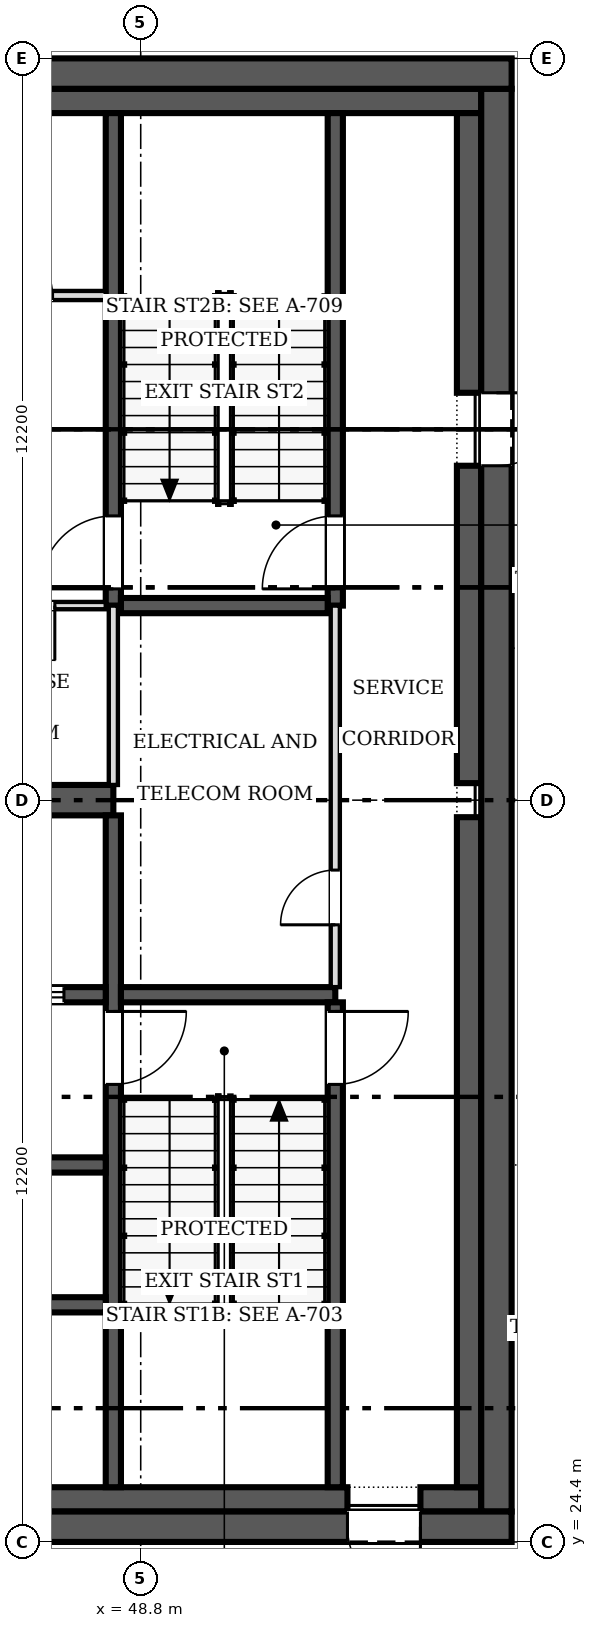
"""IFC4 building model, lengths in metres.
Left out: names, types, materials, properties, quantities, classifications, styles, units other than length and angle.
Written with IfcOpenShell. Run it as: python <this file> out.ifc"""

import sys

from ifc_helpers import new_model, si_unit, direction, frame, frame_2d, origin, place, context, subcontext, project, spatial, rectangle, extrude, source, transform, mapped, element, fill, save


model = new_model("IFC4")
c1 = context("Model", 3, precision=1e-05, world=origin(), true_north=direction((0.0, 1.0)))
c2 = subcontext(c1, "Body", "Model", "MODEL_VIEW")
j1 = project(units=[si_unit("LENGTHUNIT", "METRE"), si_unit("PLANEANGLEUNIT", "RADIAN")], contexts=[c1])
p1 = place(None, origin())
s1 = spatial("IfcSite", under=j1, at=p1, CompositionType="ELEMENT")
p2 = place(p1, origin())
s2 = spatial("IfcBuilding", under=s1, at=p2, CompositionType="ELEMENT")
p3 = place(p2, frame((0.0, 0.0, 193.4)))
s3 = spatial("IfcBuildingStorey", under=s2, at=p3, CompositionType="ELEMENT", Elevation=193.4)
p4 = place(p3, frame((54.9, 24.65, 0.0), z_axis=(0.0, 0.0, 1.0), x_axis=(-1.0, 0.0, 0.0)))
e1 = element("IfcWall", 1, at=p4, inside=s3, PredefinedType="SHEAR", context=c2, shape_type="SweptSolid", body=[
    extrude(rectangle(XDim=24.4, YDim=0.5, at=frame_2d((12.2, 0.0))), origin(), (0.0, 0.0, 1.0), 4.5),
])
m1 = source(origin(), c2, "Body", "SweptSolid", [
    extrude(rectangle(XDim=1.2, YDim=2.1, at=frame_2d((0.6, 1.05))), frame((0.0, 0.26, 0.0), z_axis=(0.0, -1.0, 0.0), x_axis=(1.0, 0.0, 0.0)), (0.0, 0.0, 1.0), 0.52),
])
p5 = place(p4, frame((1.5, 0.0, 0.0)))
e2 = element("IfcOpeningElement", 2, at=p5, cuts=e1, PredefinedType="OPENING", context=c2, shape_type="MappedRepresentation", body=[
    mapped(m1, transform((0.0, 0.0, 0.0), scale=1.0)),
])
p6 = place(p3, frame((30.5, 48.55, 0.0), z_axis=(0.0, 0.0, 1.0), x_axis=(1.0, 0.0, 0.0)))
e3 = element("IfcWall", 3, at=p6, inside=s3, PredefinedType="SHEAR", context=c2, shape_type="SweptSolid", body=[
    extrude(rectangle(XDim=24.4, YDim=0.5, at=frame_2d((12.2, 0.0))), origin(), (0.0, 0.0, 1.0), 4.5),
])
p7 = place(p3, frame((54.65, 48.3, 0.0), z_axis=(0.0, 0.0, 1.0), x_axis=(0.0, -1.0, 0.0)))
e4 = element("IfcWall", 4, at=p7, inside=s3, PredefinedType="SHEAR", context=c2, shape_type="SweptSolid", body=[
    extrude(rectangle(XDim=23.4, YDim=0.5, at=frame_2d((11.7, 0.0))), origin(), (0.0, 0.0, 1.0), 4.5),
])
p8 = place(p7, frame((5.0, 0.0, 0.0)))
e5 = element("IfcOpeningElement", 5, at=p8, cuts=e4, PredefinedType="OPENING", context=c2, shape_type="MappedRepresentation", body=[
    mapped(m1, transform((0.0, 0.0, 0.0), scale=1.0)),
])
p9 = place(p3, frame((31.0, 25.1, 0.0), z_axis=(0.0, 0.0, 1.0), x_axis=(1.0, 0.0, 0.0)))
e6 = element("IfcWall", 6, at=p9, inside=s3, PredefinedType="SOLIDWALL", context=c2, shape_type="SweptSolid", body=[
    extrude(rectangle(XDim=21.2, YDim=0.4, at=frame_2d((10.6, 0.0))), origin(), (0.0, 0.0, 1.0), 4.5),
])
p10 = place(p3, frame((53.4, 25.1, 0.0), z_axis=(0.0, 0.0, 1.0), x_axis=(1.0, 0.0, 0.0)))
e7 = element("IfcWall", 7, at=p10, inside=s3, PredefinedType="SOLIDWALL", context=c2, shape_type="SweptSolid", body=[
    extrude(rectangle(XDim=1.0, YDim=0.4, at=frame_2d((0.5, 0.0))), origin(), (0.0, 0.0, 1.0), 4.5),
])
p11 = place(p3, frame((31.0, 48.1, 0.0), z_axis=(0.0, 0.0, 1.0), x_axis=(1.0, 0.0, 0.0)))
e8 = element("IfcWall", 8, at=p11, inside=s3, PredefinedType="SOLIDWALL", context=c2, shape_type="SweptSolid", body=[
    extrude(rectangle(XDim=23.4, YDim=0.4, at=frame_2d((11.7, 0.0))), origin(), (0.0, 0.0, 1.0), 4.5),
])
p12 = place(p3, frame((54.2, 25.3, 0.0), z_axis=(0.0, 0.0, 1.0), x_axis=(0.0, 1.0, 0.0)))
e9 = element("IfcWall", 9, at=p12, inside=s3, PredefinedType="SOLIDWALL", context=c2, shape_type="SweptSolid", body=[
    extrude(rectangle(XDim=11.02, YDim=0.4, at=frame_2d((5.51, 0.0))), origin(), (0.0, 0.0, 1.0), 4.5),
])
p13 = place(p3, frame((54.2, 36.88, 0.0), z_axis=(0.0, 0.0, 1.0), x_axis=(0.0, 1.0, 0.0)))
e10 = element("IfcWall", 10, at=p13, inside=s3, PredefinedType="SOLIDWALL", context=c2, shape_type="SweptSolid", body=[
    extrude(rectangle(XDim=5.22, YDim=0.4, at=frame_2d((2.61, 0.0))), origin(), (0.0, 0.0, 1.0), 4.5),
])
p14 = place(p3, frame((54.2, 43.3, 0.0), z_axis=(0.0, 0.0, 1.0), x_axis=(0.0, 1.0, 0.0)))
e11 = element("IfcWall", 11, at=p14, inside=s3, PredefinedType="SOLIDWALL", context=c2, shape_type="SweptSolid", body=[
    extrude(rectangle(XDim=4.6, YDim=0.4, at=frame_2d((2.3, 0.0))), origin(), (0.0, 0.0, 1.0), 4.5),
])
p15 = place(p3, frame((31.4, 36.6, 0.0), z_axis=(0.0, 0.0, 1.0), x_axis=(1.0, 0.0, 0.0)))
e12 = element("IfcWall", 12, at=p15, inside=s3, PredefinedType="SHEAR", context=c2, shape_type="SweptSolid", body=[
    extrude(rectangle(XDim=16.95, YDim=0.5, at=frame_2d((8.475, 0.0))), origin(), (0.0, 0.0, 1.0), 4.5),
])
p16 = place(p3, frame((48.35, 36.35, 0.0), z_axis=(0.0, 0.0, 1.0), x_axis=(0.0, -1.0, 0.0)))
e13 = element("IfcWall", 13, at=p16, inside=s3, PredefinedType="SOLIDWALL", context=c2, shape_type="SweptSolid", body=[
    extrude(rectangle(XDim=11.05, YDim=0.25, at=frame_2d((5.525, 0.0))), origin(), (0.0, 0.0, 1.0), 4.5),
])
m2 = source(origin(), c2, "Body", "SweptSolid", [
    extrude(rectangle(XDim=1.2, YDim=2.1, at=frame_2d((0.6, 1.05))), frame((0.0, 0.135, 0.0), z_axis=(0.0, -1.0, 0.0), x_axis=(1.0, 0.0, 0.0)), (0.0, 0.0, 1.0), 0.27),
])
p17 = place(p16, frame((3.225, 0.0, 0.0)))
e14 = element("IfcOpeningElement", 14, at=p17, cuts=e13, PredefinedType="OPENING", context=c2, shape_type="MappedRepresentation", body=[
    mapped(m2, transform((0.0, 0.0, 0.0), scale=1.0)),
])
p18 = place(p3, frame((48.225, 33.4, 0.0), z_axis=(0.0, 0.0, 1.0), x_axis=(-1.0, 0.0, 0.0)))
e15 = element("IfcWall", 15, at=p18, inside=s3, PredefinedType="SOLIDWALL", context=c2, shape_type="SweptSolid", body=[
    extrude(rectangle(XDim=5.275, YDim=0.25, at=frame_2d((2.638, 0.0))), origin(), (0.0, 0.0, 1.0), 4.5),
])
p19 = place(p18, frame((3.512, 0.0, 0.0)))
e16 = element("IfcOpeningElement", 16, at=p19, cuts=e15, PredefinedType="OPENING", context=c2, shape_type="MappedRepresentation", body=[
    mapped(m2, transform((0.0, 0.0, 0.0), scale=1.0)),
])
p20 = place(p18, frame((0.688, 0.0, 0.0)))
e17 = element("IfcOpeningElement", 17, at=p20, cuts=e15, PredefinedType="OPENING", context=c2, shape_type="MappedRepresentation", body=[
    mapped(m2, transform((0.0, 0.0, 0.0), scale=1.0)),
])
p21 = place(p3, frame((48.475, 33.4, 0.0), z_axis=(0.0, 0.0, 1.0), x_axis=(1.0, 0.0, 0.0)))
e18 = element("IfcWall", 18, at=p21, inside=s3, PredefinedType="SOLIDWALL", context=c2, shape_type="SweptSolid", body=[
    extrude(rectangle(XDim=3.525, YDim=0.25, at=frame_2d((1.762, 0.0))), origin(), (0.0, 0.0, 1.0), 4.5),
])
p22 = place(p3, frame((48.35, 47.9, 0.0), z_axis=(0.0, 0.0, 1.0), x_axis=(0.0, -1.0, 0.0)))
e19 = element("IfcWall", 19, at=p22, inside=s3, PredefinedType="SOLIDWALL", context=c2, shape_type="SweptSolid", body=[
    extrude(rectangle(XDim=8.1, YDim=0.25, at=frame_2d((4.05, 0.0))), origin(), (0.0, 0.0, 1.0), 4.5),
])
p23 = place(p22, frame((6.625, 0.0, 0.0)))
e20 = element("IfcOpeningElement", 20, at=p23, cuts=e19, PredefinedType="OPENING", context=c2, shape_type="MappedRepresentation", body=[
    mapped(m2, transform((0.0, 0.0, 0.0), scale=1.0)),
])
p24 = place(p3, frame((52.0, 25.3, 0.0), z_axis=(0.0, 0.0, 1.0), x_axis=(0.0, 1.0, 0.0)))
e21 = element("IfcWall", 21, at=p24, inside=s3, PredefinedType="SOLIDWALL", context=c2, shape_type="SweptSolid", body=[
    extrude(rectangle(XDim=7.975, YDim=0.25, at=frame_2d((3.987, 0.0))), origin(), (0.0, 0.0, 1.0), 4.5),
])
p25 = place(p24, frame((6.625, 0.0, 0.0)))
e22 = element("IfcOpeningElement", 22, at=p25, cuts=e21, PredefinedType="OPENING", context=c2, shape_type="MappedRepresentation", body=[
    mapped(m2, transform((0.0, 0.0, 0.0), scale=1.0)),
])
p26 = place(p3, frame((52.0, 39.8, 0.0), z_axis=(0.0, 0.0, 1.0), x_axis=(0.0, 1.0, 0.0)))
e23 = element("IfcWall", 23, at=p26, inside=s3, PredefinedType="SOLIDWALL", context=c2, shape_type="SweptSolid", body=[
    extrude(rectangle(XDim=8.1, YDim=0.25, at=frame_2d((4.05, 0.0))), origin(), (0.0, 0.0, 1.0), 4.5),
])
p27 = place(p26, frame((0.275, 0.0, 0.0)))
e24 = element("IfcOpeningElement", 24, at=p27, cuts=e23, PredefinedType="OPENING", context=c2, shape_type="MappedRepresentation", body=[
    mapped(m2, transform((0.0, 0.0, 0.0), scale=1.0)),
])
for number, where, z_axis, x_axis in (
    (25, (42.95, 28.3, 0.0), (0.0, 0.0, 1.0), (1.0, 0.0, 0.0)),
    (26, (42.95, 30.6, 0.0), (0.0, 0.0, 1.0), (1.0, 0.0, 0.0)),
):
    element("IfcWall", number, at=place(p3, frame(where, z_axis=z_axis, x_axis=x_axis)), inside=s3, PredefinedType="SOLIDWALL", context=c2, shape_type="SweptSolid", body=[
        extrude(rectangle(XDim=5.275, YDim=0.25, at=frame_2d((2.638, 0.0))), origin(), (0.0, 0.0, 1.0), 4.5),
    ])
p28 = place(p3, frame((48.475, 39.8, 0.0), z_axis=(0.0, 0.0, 1.0), x_axis=(1.0, 0.0, 0.0)))
e27 = element("IfcWall", 27, at=p28, inside=s3, PredefinedType="SOLIDWALL", context=c2, shape_type="SweptSolid", body=[
    extrude(rectangle(XDim=3.4, YDim=0.25, at=frame_2d((1.7, 0.0))), origin(), (0.0, 0.0, 1.0), 4.5),
])
p29 = place(p3, frame((52.0, 33.525, 0.0), z_axis=(0.0, 0.0, 1.0), x_axis=(0.0, 1.0, 0.0)))
e28 = element("IfcWall", 28, at=p29, inside=s3, PredefinedType="PARTITIONING", context=c2, shape_type="SweptSolid", body=[
    extrude(rectangle(XDim=6.275, YDim=0.15, at=frame_2d((3.138, 0.0))), origin(), (0.0, 0.0, 1.0), 4.3),
])
m3 = source(origin(), c2, "Body", "SweptSolid", [
    extrude(rectangle(XDim=0.9, YDim=2.1, at=frame_2d((0.45, 1.05))), frame((0.0, 0.085, 0.0), z_axis=(0.0, -1.0, 0.0), x_axis=(1.0, 0.0, 0.0)), (0.0, 0.0, 1.0), 0.17),
])
p30 = place(p29, frame((1.025, 0.0, 0.0)))
e29 = element("IfcOpeningElement", 29, at=p30, cuts=e28, PredefinedType="OPENING", context=c2, shape_type="MappedRepresentation", body=[
    mapped(m3, transform((0.0, 0.0, 0.0), scale=1.0)),
])
p31 = place(p3, frame((48.35, 36.85, 0.0), z_axis=(0.0, 0.0, 1.0), x_axis=(0.0, 1.0, 0.0)))
e30 = element("IfcWall", 30, at=p31, inside=s3, PredefinedType="PARTITIONING", context=c2, shape_type="SweptSolid", body=[
    extrude(rectangle(XDim=2.95, YDim=0.15, at=frame_2d((1.475, 0.0))), origin(), (0.0, 0.0, 1.0), 4.3),
])
p32 = place(p3, frame((48.225, 39.8, 0.0), z_axis=(0.0, 0.0, 1.0), x_axis=(-1.0, 0.0, 0.0)))
e31 = element("IfcWall", 31, at=p32, inside=s3, PredefinedType="PARTITIONING", context=c2, shape_type="SweptSolid", body=[
    extrude(rectangle(XDim=2.625, YDim=0.12, at=frame_2d((1.312, 0.0))), origin(), (0.0, 0.0, 1.0), 4.3),
])
m4 = source(origin(), c2, "Body", "SweptSolid", [
    extrude(rectangle(XDim=0.9, YDim=2.1, at=frame_2d((0.45, 1.05))), frame((0.0, 0.07, 0.0), z_axis=(0.0, -1.0, 0.0), x_axis=(1.0, 0.0, 0.0)), (0.0, 0.0, 1.0), 0.14),
])
p33 = place(p32, frame((0.837, 0.0, 0.0)))
e32 = element("IfcOpeningElement", 32, at=p33, cuts=e31, PredefinedType="OPENING", context=c2, shape_type="MappedRepresentation", body=[
    mapped(m4, transform((0.0, 0.0, 0.0), scale=1.0)),
])
p34 = place(p3, frame((45.6, 44.9, 0.0), z_axis=(0.0, 0.0, 1.0), x_axis=(1.0, 0.0, 0.0)))
e33 = element("IfcWall", 33, at=p34, inside=s3, PredefinedType="PARTITIONING", context=c2, shape_type="SweptSolid", body=[
    extrude(rectangle(XDim=2.625, YDim=0.15, at=frame_2d((1.312, 0.0))), origin(), (0.0, 0.0, 1.0), 4.3),
])
p35 = place(p34, frame((0.85, 0.0, 0.0)))
e34 = element("IfcOpeningElement", 34, at=p35, cuts=e33, PredefinedType="OPENING", context=c2, shape_type="MappedRepresentation", body=[
    mapped(m3, transform((0.0, 0.0, 0.0), scale=1.0)),
])
m5 = source(origin(), c2, "Body", "SweptSolid", [
    extrude(rectangle(XDim=1.2, YDim=2.1, at=frame_2d((0.6, 1.05))), frame((0.0, 0.025, 0.0), z_axis=(0.0, -1.0, 0.0), x_axis=(1.0, 0.0, 0.0)), (0.0, 0.0, 1.0), 0.05),
])
p36 = place(p5, origin())
e35 = element("IfcDoor", 35, at=p36, inside=s3, OperationType="SINGLE_SWING_LEFT", PredefinedType="DOOR", context=c2, shape_type="MappedRepresentation", body=[
    mapped(m5, transform((0.0, 0.0, 0.0), scale=1.0)),
])
fill(e2, e35)
p37 = place(p8, origin())
e36 = element("IfcDoor", 36, at=p37, inside=s3, OperationType="SINGLE_SWING_LEFT", PredefinedType="DOOR", context=c2, shape_type="MappedRepresentation", body=[
    mapped(m5, transform((0.0, 0.0, 0.0), scale=1.0)),
])
fill(e5, e36)
p38 = place(p17, origin())
e37 = element("IfcDoor", 37, at=p38, inside=s3, OperationType="SINGLE_SWING_LEFT", PredefinedType="DOOR", context=c2, shape_type="MappedRepresentation", body=[
    mapped(m5, transform((0.0, 0.0, 0.0), scale=1.0)),
])
fill(e14, e37)
p39 = place(p20, origin())
e38 = element("IfcDoor", 38, at=p39, inside=s3, OperationType="DOUBLE_DOOR_SLIDING", PredefinedType="DOOR", context=c2, shape_type="MappedRepresentation", body=[
    mapped(m5, transform((0.0, 0.0, 0.0), scale=1.0)),
])
fill(e17, e38)
p40 = place(p23, origin())
e39 = element("IfcDoor", 39, at=p40, inside=s3, OperationType="SINGLE_SWING_RIGHT", PredefinedType="DOOR", context=c2, shape_type="MappedRepresentation", body=[
    mapped(m5, transform((0.0, 0.0, 0.0), scale=1.0)),
])
fill(e20, e39)
p41 = place(p25, origin())
e40 = element("IfcDoor", 40, at=p41, inside=s3, OperationType="SINGLE_SWING_RIGHT", PredefinedType="DOOR", context=c2, shape_type="MappedRepresentation", body=[
    mapped(m5, transform((0.0, 0.0, 0.0), scale=1.0)),
])
fill(e22, e40)
p42 = place(p27, origin())
e41 = element("IfcDoor", 41, at=p42, inside=s3, OperationType="SINGLE_SWING_LEFT", PredefinedType="DOOR", context=c2, shape_type="MappedRepresentation", body=[
    mapped(m5, transform((0.0, 0.0, 0.0), scale=1.0)),
])
fill(e24, e41)
m6 = source(origin(), c2, "Body", "SweptSolid", [
    extrude(rectangle(XDim=0.9, YDim=2.1, at=frame_2d((0.45, 1.05))), frame((0.0, 0.025, 0.0), z_axis=(0.0, -1.0, 0.0), x_axis=(1.0, 0.0, 0.0)), (0.0, 0.0, 1.0), 0.05),
])
p43 = place(p30, origin())
e42 = element("IfcDoor", 42, at=p43, inside=s3, OperationType="SINGLE_SWING_LEFT", PredefinedType="DOOR", context=c2, shape_type="MappedRepresentation", body=[
    mapped(m6, transform((0.0, 0.0, 0.0), scale=1.0)),
])
fill(e29, e42)
p44 = place(p33, origin())
e43 = element("IfcDoor", 43, at=p44, inside=s3, OperationType="SINGLE_SWING_LEFT", PredefinedType="DOOR", context=c2, shape_type="MappedRepresentation", body=[
    mapped(m6, transform((0.0, 0.0, 0.0), scale=1.0)),
])
fill(e32, e43)
save(model, sys.argv[1])
